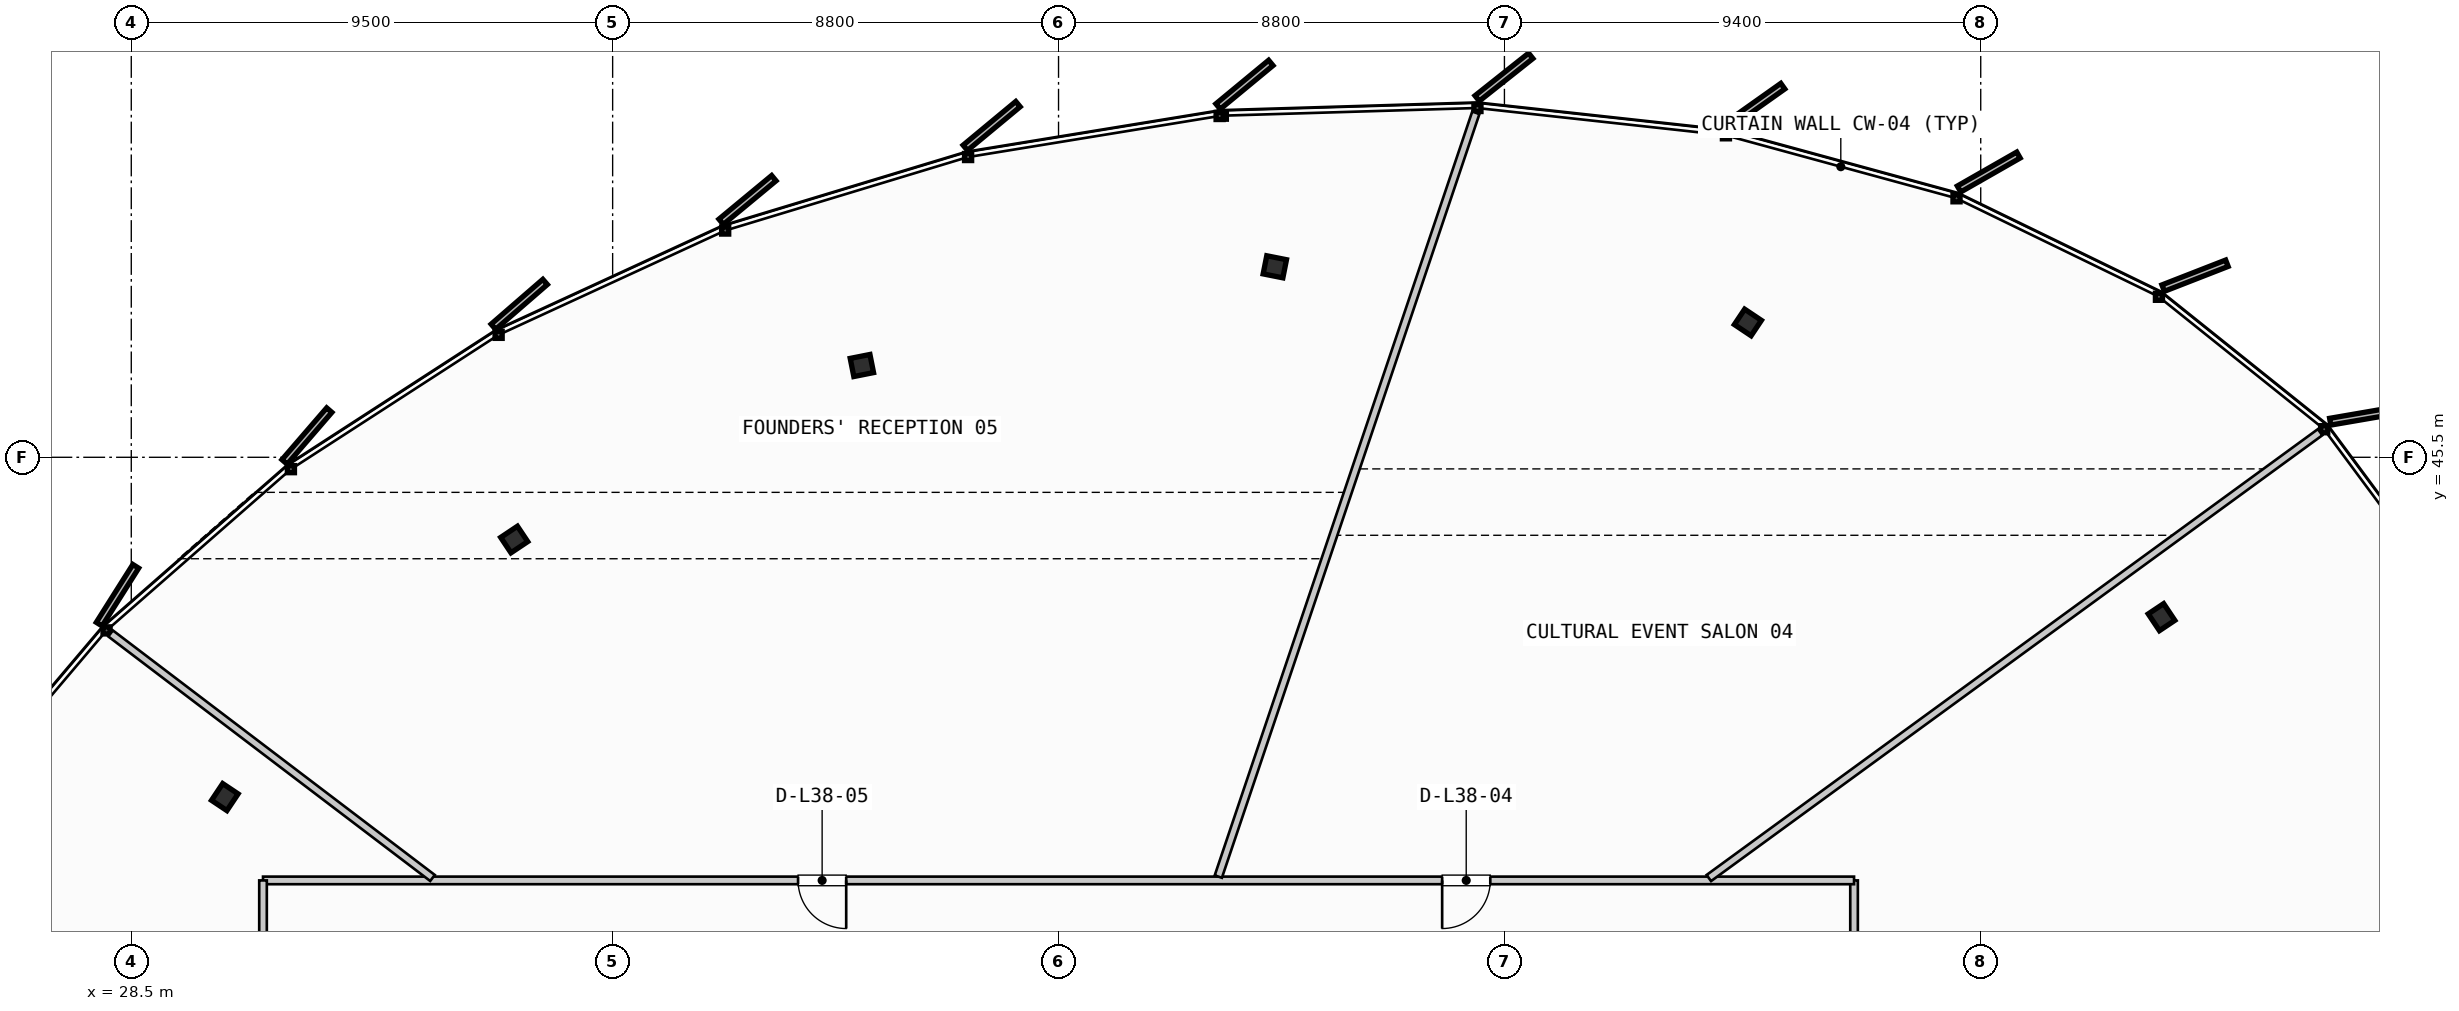
"""IFC4 building model, lengths in metres.
Left out: names, types, materials, properties, quantities, classifications, styles, units other than length and angle.
Written with IfcOpenShell. Run it as: python <this file> out.ifc"""

import sys

from ifc_helpers import new_model, si_unit, direction, frame, frame_2d, origin, origin_2d, place, context, subcontext, project, spatial, rectangle, i_section, extrude, source, transform, mapped, element, fill, save


model = new_model("IFC4")
c1 = context("Model", 3, precision=1e-05, world=origin(), true_north=direction((0.0, 1.0)))
c2 = subcontext(c1, "Body", "Model", "MODEL_VIEW")
j1 = project(units=[si_unit("LENGTHUNIT", "METRE"), si_unit("PLANEANGLEUNIT", "RADIAN")], contexts=[c1])
p1 = place(None, origin())
s1 = spatial("IfcSite", under=j1, at=p1, CompositionType="ELEMENT")
p2 = place(p1, origin())
s2 = spatial("IfcBuilding", under=s1, at=p2, CompositionType="ELEMENT")
p3 = place(p2, frame((0.0, 0.0, 150.1)))
s3 = spatial("IfcBuildingStorey", under=s2, at=p3, CompositionType="ELEMENT", Elevation=150.1)
m1 = source(origin(), c2, "Body", "SweptSolid", [
    extrude(i_section(OverallWidth=0.397, OverallDepth=0.365, WebThickness=0.028, FlangeThickness=0.044, FilletRadius=0.015, at=origin_2d()), origin(), (0.0, 0.0, 1.0), 3.3),
])
for number, where, z_axis, x_axis in (
    (1, (68.569, 42.345, 0.0), (0.0, 0.0, 1.0), (0.831, 0.556, 0.0)),
    (2, (60.405, 48.161, 0.0), (0.0, 0.0, 1.0), (0.556, 0.831, 0.0)),
    (3, (51.069, 49.259, 0.0), (0.0, 0.0, 1.0), (0.195, 0.981, 0.0)),
    (4, (42.919, 47.311, 0.0), (0.0, 0.0, 1.0), (-0.195, 0.981, 0.0)),
    (5, (36.058, 43.877, 0.0), (0.0, 0.0, 1.0), (-0.556, 0.831, 0.0)),
    (6, (30.346, 38.794, 0.0), (0.0, 0.0, 1.0), (-0.831, 0.556, 0.0)),
):
    element("IfcColumn", number, at=place(p3, frame(where, z_axis=z_axis, x_axis=x_axis)), inside=s3, PredefinedType="COLUMN", context=c2, shape_type="MappedRepresentation", body=[
        mapped(m1, transform((0.0, 0.0, 0.0), scale=1.0)),
    ])
p4 = place(p3, frame((62.5, 35.45, 0.0), z_axis=(0.0, 0.0, 1.0), x_axis=(0.0, 1.0, 0.0)))
e7 = element("IfcWall", 7, at=p4, inside=s3, PredefinedType="PARTITIONING", context=c2, shape_type="SweptSolid", body=[
    extrude(rectangle(XDim=1.7, YDim=0.15, at=frame_2d((0.85, 0.0))), origin(), (0.0, 0.0, 1.0), 2.28),
])
p5 = place(p3, frame((62.5, 37.15, 0.0), z_axis=(0.0, 0.0, 1.0), x_axis=(-1.0, 0.0, 0.0)))
e8 = element("IfcWall", 8, at=p5, inside=s3, PredefinedType="PARTITIONING", context=c2, shape_type="SweptSolid", body=[
    extrude(rectangle(XDim=31.4, YDim=0.15, at=frame_2d((15.7, 0.0))), origin(), (0.0, 0.0, 1.0), 2.28),
])
p6 = place(p5, frame((7.179, 0.0, 0.0)))
e9 = element("IfcOpeningElement", 9, at=p6, cuts=e8, PredefinedType="OPENING", context=c2, shape_type="SweptSolid", body=[
    extrude(rectangle(XDim=0.95, YDim=2.15, at=frame_2d((0.475, 1.075))), frame((0.0, 0.085, 0.0), z_axis=(0.0, -1.0, 0.0), x_axis=(1.0, 0.0, 0.0)), (0.0, 0.0, 1.0), 0.17),
])
p7 = place(p5, frame((19.89, 0.0, 0.0)))
e10 = element("IfcOpeningElement", 10, at=p7, cuts=e8, PredefinedType="OPENING", context=c2, shape_type="SweptSolid", body=[
    extrude(rectangle(XDim=0.95, YDim=2.15, at=frame_2d((0.475, 1.075))), frame((0.0, 0.085, 0.0), z_axis=(0.0, -1.0, 0.0), x_axis=(1.0, 0.0, 0.0)), (0.0, 0.0, 1.0), 0.17),
])
p8 = place(p3, frame((31.1, 37.15, 0.0), z_axis=(0.0, 0.0, 1.0), x_axis=(0.0, -1.0, 0.0)))
e11 = element("IfcWall", 11, at=p8, inside=s3, PredefinedType="PARTITIONING", context=c2, shape_type="SweptSolid", body=[
    extrude(rectangle(XDim=1.7, YDim=0.15, at=frame_2d((0.85, 0.0))), origin(), (0.0, 0.0, 1.0), 2.28),
])
p9 = place(p3, frame((59.634, 37.197, 0.0), z_axis=(0.0, 0.0, 1.0), x_axis=(0.807951901315, 0.58924844095, 0.0)))
e12 = element("IfcWall", 12, at=p9, inside=s3, PredefinedType="PARTITIONING", context=c2, shape_type="SweptSolid", body=[
    extrude(rectangle(XDim=14.931, YDim=0.15, at=frame_2d((7.465, 0.0))), origin(), (0.0, 0.0, 1.0), 2.28),
])
p10 = place(p3, frame((49.954, 37.226, 0.0), z_axis=(0.0, 0.0, 1.0), x_axis=(0.319485991286, 0.947590998993, 0.0)))
e13 = element("IfcWall", 13, at=p10, inside=s3, PredefinedType="PARTITIONING", context=c2, shape_type="SweptSolid", body=[
    extrude(rectangle(XDim=15.906, YDim=0.15, at=frame_2d((7.953, 0.0))), origin(), (0.0, 0.0, 1.0), 2.28),
])
p11 = place(p3, frame((34.445, 37.198, 0.0), z_axis=(0.0, 0.0, 1.0), x_axis=(-0.796342033143, 0.60484656422, 0.0)))
e14 = element("IfcWall", 14, at=p11, inside=s3, PredefinedType="PARTITIONING", context=c2, shape_type="SweptSolid", body=[
    extrude(rectangle(XDim=7.977, YDim=0.15, at=frame_2d((3.989, 0.0))), origin(), (0.0, 0.0, 1.0), 2.28),
])
m2 = source(origin(), c2, "Body", "SweptSolid", [
    extrude(rectangle(XDim=0.95, YDim=2.15, at=frame_2d((0.475, 1.075))), frame((0.0, 0.025, 0.0), z_axis=(0.0, -1.0, 0.0), x_axis=(1.0, 0.0, 0.0)), (0.0, 0.0, 1.0), 0.05),
])
p12 = place(p6, origin())
e15 = element("IfcDoor", 15, at=p12, inside=s3, OperationType="SINGLE_SWING_RIGHT", PredefinedType="DOOR", context=c2, shape_type="MappedRepresentation", body=[
    mapped(m2, transform((0.0, 0.0, 0.0), scale=1.0)),
])
fill(e9, e15)
p13 = place(p7, origin())
e16 = element("IfcDoor", 16, at=p13, inside=s3, OperationType="SINGLE_SWING_LEFT", PredefinedType="DOOR", context=c2, shape_type="MappedRepresentation", body=[
    mapped(m2, transform((0.0, 0.0, 0.0), scale=1.0)),
])
fill(e10, e16)
save(model, sys.argv[1])
